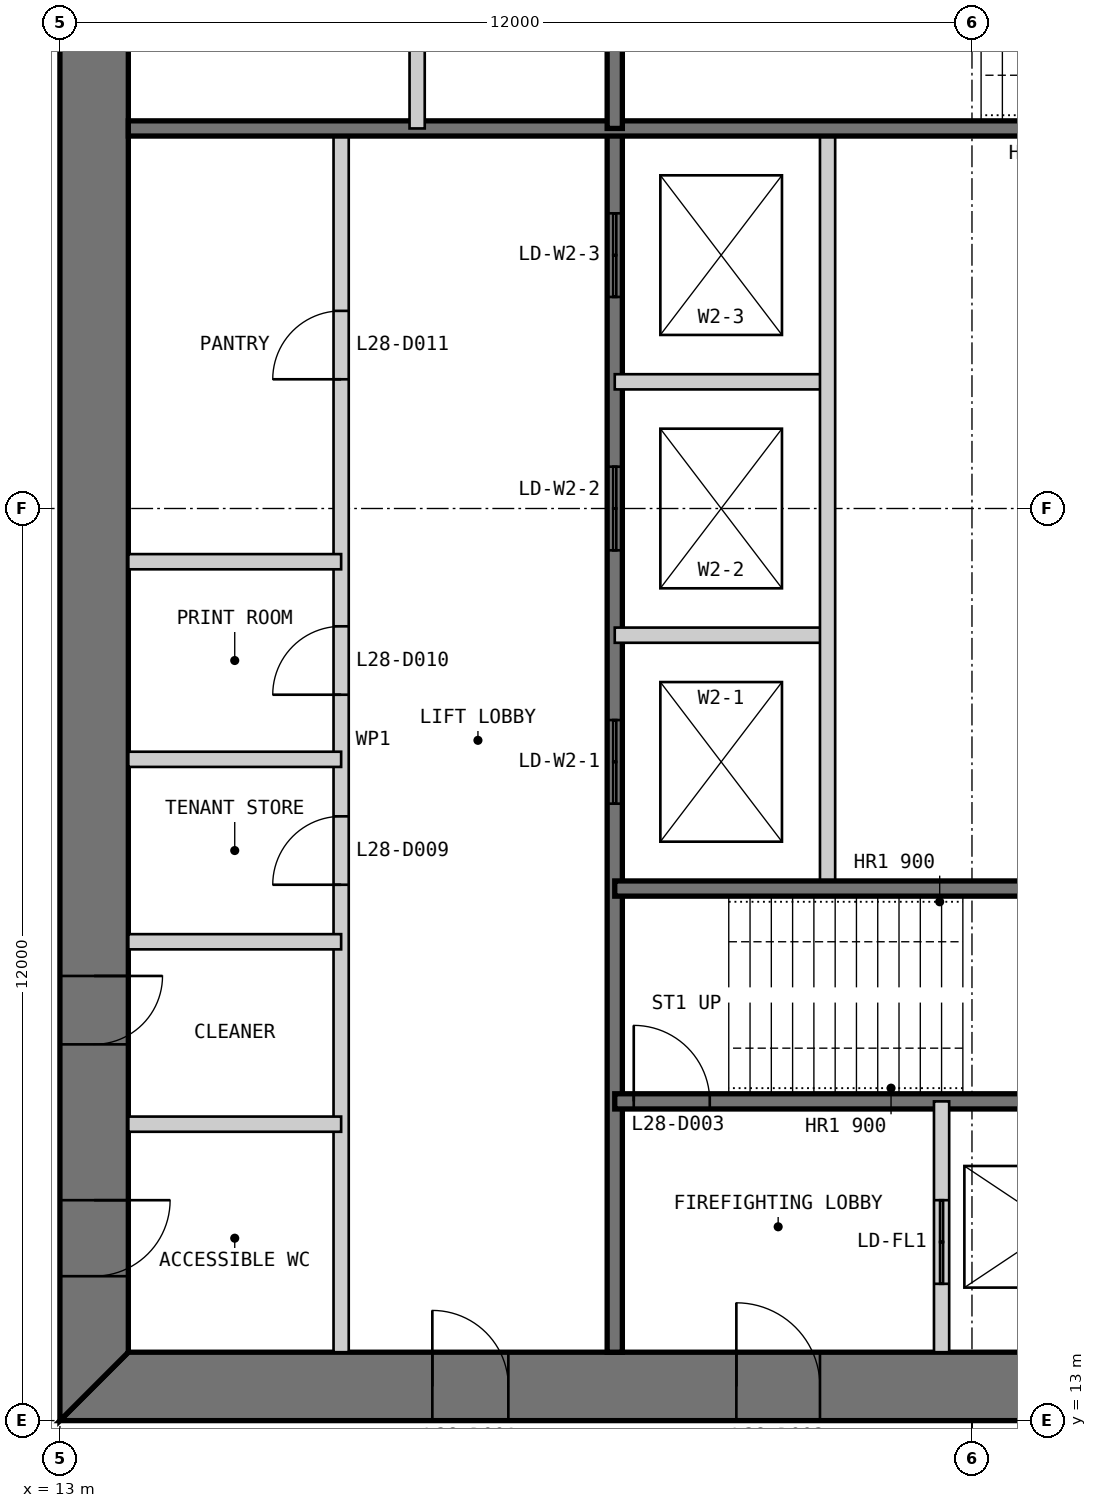
"""IFC4 building model, lengths in metres.
Left out: names, types, materials, properties, quantities, classifications, styles, units other than length and angle.
Written with IfcOpenShell. Run it as: python <this file> out.ifc"""

import sys

from ifc_helpers import new_model, si_unit, direction, frame, frame_2d, origin, place, context, subcontext, project, spatial, polyline, rectangle, outline, extrude, element, fill, save


model = new_model("IFC4")
c1 = context("Model", 3, precision=1e-05, world=origin(), true_north=direction((0.0, 1.0)))
c2 = subcontext(c1, "Body", "Model", "MODEL_VIEW")
j1 = project(units=[si_unit("LENGTHUNIT", "METRE"), si_unit("PLANEANGLEUNIT", "RADIAN")], contexts=[c1])
p1 = place(None, origin())
s1 = spatial("IfcSite", under=j1, at=p1, CompositionType="ELEMENT")
p2 = place(p1, origin())
s2 = spatial("IfcBuilding", under=s1, at=p2, CompositionType="ELEMENT")
p3 = place(p2, frame((0.0, 0.0, 122.4)))
s3 = spatial("IfcBuildingStorey", under=s2, at=p3, CompositionType="ELEMENT", Elevation=122.4)
p4 = place(p3, frame((13.0, 13.45, 0.0), z_axis=(0.0, 0.0, 1.0), x_axis=(1.0, 0.0, 0.0)))
e1 = element("IfcWall", 1, at=p4, inside=s3, PredefinedType="SHEAR", context=c2, shape_type="SweptSolid", body=[
    extrude(outline(polyline([(0.0, -0.45), (24.0, -0.45), (23.1, 0.45), (0.9, 0.45), (0.0, -0.45)])), origin(), (0.0, 0.0, 1.0), 4.0),
])
p5 = place(p4, frame((4.9, 0.0, 0.0)))
e2 = element("IfcOpeningElement", 2, at=p5, cuts=e1, PredefinedType="OPENING", context=c2, shape_type="SweptSolid", body=[
    extrude(rectangle(XDim=1.0, YDim=2.2, at=frame_2d((0.5, 1.1))), frame((0.0, 0.46, 0.0), z_axis=(0.0, -1.0, 0.0), x_axis=(1.0, 0.0, 0.0)), (0.0, 0.0, 1.0), 0.92),
])
p6 = place(p4, frame((8.9, 0.0, 0.0)))
e3 = element("IfcOpeningElement", 3, at=p6, cuts=e1, PredefinedType="OPENING", context=c2, shape_type="SweptSolid", body=[
    extrude(rectangle(XDim=1.1, YDim=2.2, at=frame_2d((0.55, 1.1))), frame((0.0, 0.46, 0.0), z_axis=(0.0, -1.0, 0.0), x_axis=(1.0, 0.0, 0.0)), (0.0, 0.0, 1.0), 0.92),
])
p7 = place(p4, frame((15.05, 0.0, 0.0)))
e4 = element("IfcOpeningElement", 4, at=p7, cuts=e1, PredefinedType="OPENING", context=c2, shape_type="SweptSolid", body=[
    extrude(rectangle(XDim=0.9, YDim=2.2, at=frame_2d((0.45, 1.1))), frame((0.0, 0.46, 0.0), z_axis=(0.0, -1.0, 0.0), x_axis=(1.0, 0.0, 0.0)), (0.0, 0.0, 1.0), 0.92),
])
p8 = place(p4, frame((17.9, 0.0, 0.0)))
e5 = element("IfcOpeningElement", 5, at=p8, cuts=e1, PredefinedType="OPENING", context=c2, shape_type="SweptSolid", body=[
    extrude(rectangle(XDim=1.0, YDim=2.2, at=frame_2d((0.5, 1.1))), frame((0.0, 0.46, 0.0), z_axis=(0.0, -1.0, 0.0), x_axis=(1.0, 0.0, 0.0)), (0.0, 0.0, 1.0), 0.92),
])
p9 = place(p4, frame((21.4, 0.0, 0.0)))
e6 = element("IfcOpeningElement", 6, at=p9, cuts=e1, PredefinedType="OPENING", context=c2, shape_type="SweptSolid", body=[
    extrude(rectangle(XDim=1.0, YDim=2.2, at=frame_2d((0.5, 1.1))), frame((0.0, 0.46, 0.0), z_axis=(0.0, -1.0, 0.0), x_axis=(1.0, 0.0, 0.0)), (0.0, 0.0, 1.0), 0.92),
])
p10 = place(p3, frame((13.45, 36.1, 0.0), z_axis=(0.0, 0.0, 1.0), x_axis=(0.0, -1.0, 0.0)))
e7 = element("IfcWall", 7, at=p10, inside=s3, PredefinedType="SHEAR", context=c2, shape_type="SweptSolid", body=[
    extrude(outline(polyline([(-0.9, -0.45), (23.1, -0.45), (22.2, 0.45), (0.0, 0.45), (-0.9, -0.45)])), origin(), (0.0, 0.0, 1.0), 4.0),
])
p11 = place(p10, frame((20.2, 0.0, 0.0)))
e8 = element("IfcOpeningElement", 8, at=p11, cuts=e7, PredefinedType="OPENING", context=c2, shape_type="SweptSolid", body=[
    extrude(rectangle(XDim=1.0, YDim=2.2, at=frame_2d((0.5, 1.1))), frame((0.0, 0.46, 0.0), z_axis=(0.0, -1.0, 0.0), x_axis=(1.0, 0.0, 0.0)), (0.0, 0.0, 1.0), 0.92),
])
p12 = place(p10, frame((17.25, 0.0, 0.0)))
e9 = element("IfcOpeningElement", 9, at=p12, cuts=e7, PredefinedType="OPENING", context=c2, shape_type="SweptSolid", body=[
    extrude(rectangle(XDim=0.9, YDim=2.2, at=frame_2d((0.45, 1.1))), frame((0.0, 0.46, 0.0), z_axis=(0.0, -1.0, 0.0), x_axis=(1.0, 0.0, 0.0)), (0.0, 0.0, 1.0), 0.92),
])
p13 = place(p3, frame((16.7, 13.9, 0.0), z_axis=(0.0, 0.0, 1.0), x_axis=(0.0, 1.0, 0.0)))
e10 = element("IfcWall", 10, at=p13, inside=s3, PredefinedType="PARTITIONING", context=c2, shape_type="SweptSolid", body=[
    extrude(rectangle(XDim=16.1, YDim=0.2, at=frame_2d((8.05, 0.0))), origin(), (0.0, 0.0, 1.0), 3.8),
])
p14 = place(p13, frame((6.15, 0.0, 0.0)))
e11 = element("IfcOpeningElement", 11, at=p14, cuts=e10, PredefinedType="OPENING", context=c2, shape_type="SweptSolid", body=[
    extrude(rectangle(XDim=0.9, YDim=2.2, at=frame_2d((0.45, 1.1))), frame((0.0, 0.11, 0.0), z_axis=(0.0, -1.0, 0.0), x_axis=(1.0, 0.0, 0.0)), (0.0, 0.0, 1.0), 0.22),
])
p15 = place(p13, frame((8.65, 0.0, 0.0)))
e12 = element("IfcOpeningElement", 12, at=p15, cuts=e10, PredefinedType="OPENING", context=c2, shape_type="SweptSolid", body=[
    extrude(rectangle(XDim=0.9, YDim=2.2, at=frame_2d((0.45, 1.1))), frame((0.0, 0.11, 0.0), z_axis=(0.0, -1.0, 0.0), x_axis=(1.0, 0.0, 0.0)), (0.0, 0.0, 1.0), 0.22),
])
p16 = place(p13, frame((12.8, 0.0, 0.0)))
e13 = element("IfcOpeningElement", 13, at=p16, cuts=e10, PredefinedType="OPENING", context=c2, shape_type="SweptSolid", body=[
    extrude(rectangle(XDim=0.9, YDim=2.2, at=frame_2d((0.45, 1.1))), frame((0.0, 0.11, 0.0), z_axis=(0.0, -1.0, 0.0), x_axis=(1.0, 0.0, 0.0)), (0.0, 0.0, 1.0), 0.22),
])
p17 = place(p3, frame((20.3, 13.9, 0.0), z_axis=(0.0, 0.0, 1.0), x_axis=(0.0, 1.0, 0.0)))
e14 = element("IfcWall", 14, at=p17, inside=s3, PredefinedType="SOLIDWALL", context=c2, shape_type="SweptSolid", body=[
    extrude(rectangle(XDim=16.1, YDim=0.2, at=frame_2d((8.05, 0.0))), origin(), (0.0, 0.0, 1.0), 3.8),
])
p18 = place(p17, frame((7.217, 0.0, 0.0)))
e15 = element("IfcOpeningElement", 15, at=p18, cuts=e14, PredefinedType="OPENING", context=c2, shape_type="SweptSolid", body=[
    extrude(rectangle(XDim=1.1, YDim=2.2, at=frame_2d((0.55, 1.1))), frame((0.0, 0.11, 0.0), z_axis=(0.0, -1.0, 0.0), x_axis=(1.0, 0.0, 0.0)), (0.0, 0.0, 1.0), 0.22),
])
p19 = place(p17, frame((10.55, 0.0, 0.0)))
e16 = element("IfcOpeningElement", 16, at=p19, cuts=e14, PredefinedType="OPENING", context=c2, shape_type="SweptSolid", body=[
    extrude(rectangle(XDim=1.1, YDim=2.2, at=frame_2d((0.55, 1.1))), frame((0.0, 0.11, 0.0), z_axis=(0.0, -1.0, 0.0), x_axis=(1.0, 0.0, 0.0)), (0.0, 0.0, 1.0), 0.22),
])
p20 = place(p17, frame((13.883, 0.0, 0.0)))
e17 = element("IfcOpeningElement", 17, at=p20, cuts=e14, PredefinedType="OPENING", context=c2, shape_type="SweptSolid", body=[
    extrude(rectangle(XDim=1.1, YDim=2.2, at=frame_2d((0.55, 1.1))), frame((0.0, 0.11, 0.0), z_axis=(0.0, -1.0, 0.0), x_axis=(1.0, 0.0, 0.0)), (0.0, 0.0, 1.0), 0.22),
])
for number, where, z_axis, x_axis in (
    (18, (20.3, 23.333, 0.0), (0.0, 0.0, 1.0), (1.0, 0.0, 0.0)),
    (19, (20.3, 26.667, 0.0), (0.0, 0.0, 1.0), (1.0, 0.0, 0.0)),
):
    element("IfcWall", number, at=place(p3, frame(where, z_axis=z_axis, x_axis=x_axis)), inside=s3, PredefinedType="PARTITIONING", context=c2, shape_type="SweptSolid", body=[
        extrude(rectangle(XDim=2.8, YDim=0.2, at=frame_2d((1.4, 0.0))), origin(), (0.0, 0.0, 1.0), 3.8),
    ])
p21 = place(p3, frame((23.1, 20.0, 0.0), z_axis=(0.0, 0.0, 1.0), x_axis=(0.0, 1.0, 0.0)))
e20 = element("IfcWall", 20, at=p21, inside=s3, PredefinedType="PARTITIONING", context=c2, shape_type="SweptSolid", body=[
    extrude(rectangle(XDim=10.0, YDim=0.2, at=frame_2d((5.0, 0.0))), origin(), (0.0, 0.0, 1.0), 3.8),
])
p22 = place(p3, frame((20.3, 17.2, 0.0), z_axis=(0.0, 0.0, 1.0), x_axis=(1.0, 0.0, 0.0)))
e21 = element("IfcWall", 21, at=p22, inside=s3, PredefinedType="SOLIDWALL", context=c2, shape_type="SweptSolid", body=[
    extrude(rectangle(XDim=9.4, YDim=0.2, at=frame_2d((4.7, 0.0))), origin(), (0.0, 0.0, 1.0), 3.8),
])
p23 = place(p22, frame((0.25, 0.0, 0.0)))
e22 = element("IfcOpeningElement", 22, at=p23, cuts=e21, PredefinedType="OPENING", context=c2, shape_type="SweptSolid", body=[
    extrude(rectangle(XDim=1.0, YDim=2.2, at=frame_2d((0.5, 1.1))), frame((0.0, 0.11, 0.0), z_axis=(0.0, -1.0, 0.0), x_axis=(1.0, 0.0, 0.0)), (0.0, 0.0, 1.0), 0.22),
])
p24 = place(p3, frame((20.3, 20.0, 0.0), z_axis=(0.0, 0.0, 1.0), x_axis=(1.0, 0.0, 0.0)))
e23 = element("IfcWall", 23, at=p24, inside=s3, PredefinedType="SOLIDWALL", context=c2, shape_type="SweptSolid", body=[
    extrude(rectangle(XDim=15.8, YDim=0.2, at=frame_2d((7.9, 0.0))), origin(), (0.0, 0.0, 1.0), 3.8),
])
p25 = place(p3, frame((24.6, 13.9, 0.0), z_axis=(0.0, 0.0, 1.0), x_axis=(0.0, 1.0, 0.0)))
e24 = element("IfcWall", 24, at=p25, inside=s3, PredefinedType="PARTITIONING", context=c2, shape_type="SweptSolid", body=[
    extrude(rectangle(XDim=3.3, YDim=0.2, at=frame_2d((1.65, 0.0))), origin(), (0.0, 0.0, 1.0), 3.8),
])
p26 = place(p25, frame((0.9, 0.0, 0.0)))
e25 = element("IfcOpeningElement", 25, at=p26, cuts=e24, PredefinedType="OPENING", context=c2, shape_type="SweptSolid", body=[
    extrude(rectangle(XDim=1.1, YDim=2.2, at=frame_2d((0.55, 1.1))), frame((0.0, 0.11, 0.0), z_axis=(0.0, -1.0, 0.0), x_axis=(1.0, 0.0, 0.0)), (0.0, 0.0, 1.0), 0.22),
])
for number, where, z_axis, x_axis in (
    (26, (13.9, 16.9, 0.0), (0.0, 0.0, 1.0), (1.0, 0.0, 0.0)),
    (27, (13.9, 19.3, 0.0), (0.0, 0.0, 1.0), (1.0, 0.0, 0.0)),
    (28, (13.9, 21.7, 0.0), (0.0, 0.0, 1.0), (1.0, 0.0, 0.0)),
    (29, (13.9, 24.3, 0.0), (0.0, 0.0, 1.0), (1.0, 0.0, 0.0)),
):
    element("IfcWall", number, at=place(p3, frame(where, z_axis=z_axis, x_axis=x_axis)), inside=s3, PredefinedType="PARTITIONING", context=c2, shape_type="SweptSolid", body=[
        extrude(rectangle(XDim=2.8, YDim=0.2, at=frame_2d((1.4, 0.0))), origin(), (0.0, 0.0, 1.0), 3.8),
    ])
p27 = place(p3, frame((29.7, 30.0, 0.0), z_axis=(0.0, 0.0, 1.0), x_axis=(-1.0, 0.0, 0.0)))
e30 = element("IfcWall", 30, at=p27, inside=s3, PredefinedType="SOLIDWALL", context=c2, shape_type="SweptSolid", body=[
    extrude(rectangle(XDim=15.8, YDim=0.2, at=frame_2d((7.9, 0.0))), origin(), (0.0, 0.0, 1.0), 3.8),
])
p28 = place(p3, frame((20.3, 36.1, 0.0), z_axis=(0.0, 0.0, 1.0), x_axis=(0.0, -1.0, 0.0)))
e31 = element("IfcWall", 31, at=p28, inside=s3, PredefinedType="SOLIDWALL", context=c2, shape_type="SweptSolid", body=[
    extrude(rectangle(XDim=6.1, YDim=0.2, at=frame_2d((3.05, 0.0))), origin(), (0.0, 0.0, 1.0), 3.8),
])
p29 = place(p3, frame((17.7, 36.1, 0.0), z_axis=(0.0, 0.0, 1.0), x_axis=(0.0, -1.0, 0.0)))
e32 = element("IfcWall", 32, at=p29, inside=s3, PredefinedType="PARTITIONING", context=c2, shape_type="SweptSolid", body=[
    extrude(rectangle(XDim=6.1, YDim=0.2, at=frame_2d((3.05, 0.0))), origin(), (0.0, 0.0, 1.0), 3.8),
])
p30 = place(p5, origin())
e33 = element("IfcDoor", 33, at=p30, inside=s3, OperationType="SINGLE_SWING_LEFT", PredefinedType="DOOR", context=c2, shape_type="SweptSolid", body=[
    extrude(rectangle(XDim=1.0, YDim=2.2, at=frame_2d((0.5, 1.1))), frame((0.0, 0.025, 0.0), z_axis=(0.0, -1.0, 0.0), x_axis=(1.0, 0.0, 0.0)), (0.0, 0.0, 1.0), 0.05),
    extrude(outline(polyline([(0.0, 0.0), (0.04, 0.0), (0.04, 2.16), (0.96, 2.16), (0.96, 0.0), (1.0, 0.0), (1.0, 2.2), (0.0, 2.2), (0.0, 0.0)])), frame((0.0, 0.3, 0.0), z_axis=(0.0, -1.0, 0.0), x_axis=(1.0, 0.0, 0.0)), (0.0, 0.0, 1.0), 0.6),
])
fill(e2, e33)
p31 = place(p6, origin())
e34 = element("IfcDoor", 34, at=p31, inside=s3, OperationType="SINGLE_SWING_LEFT", PredefinedType="DOOR", context=c2, shape_type="SweptSolid", body=[
    extrude(rectangle(XDim=1.1, YDim=2.2, at=frame_2d((0.55, 1.1))), frame((0.0, 0.025, 0.0), z_axis=(0.0, -1.0, 0.0), x_axis=(1.0, 0.0, 0.0)), (0.0, 0.0, 1.0), 0.05),
    extrude(outline(polyline([(0.0, 0.0), (0.04, 0.0), (0.04, 2.16), (1.06, 2.16), (1.06, 0.0), (1.1, 0.0), (1.1, 2.2), (0.0, 2.2), (0.0, 0.0)])), frame((0.0, 0.3, 0.0), z_axis=(0.0, -1.0, 0.0), x_axis=(1.0, 0.0, 0.0)), (0.0, 0.0, 1.0), 0.6),
])
fill(e3, e34)
p32 = place(p23, origin())
e35 = element("IfcDoor", 35, at=p32, inside=s3, OperationType="SINGLE_SWING_LEFT", PredefinedType="DOOR", context=c2, shape_type="SweptSolid", body=[
    extrude(rectangle(XDim=1.0, YDim=2.2, at=frame_2d((0.5, 1.1))), frame((0.0, 0.025, 0.0), z_axis=(0.0, -1.0, 0.0), x_axis=(1.0, 0.0, 0.0)), (0.0, 0.0, 1.0), 0.05),
])
fill(e22, e35)
p33 = place(p11, origin())
e36 = element("IfcDoor", 36, at=p33, inside=s3, OperationType="SINGLE_SWING_LEFT", PredefinedType="DOOR", context=c2, shape_type="SweptSolid", body=[
    extrude(rectangle(XDim=1.0, YDim=2.2, at=frame_2d((0.5, 1.1))), frame((0.0, 0.025, 0.0), z_axis=(0.0, -1.0, 0.0), x_axis=(1.0, 0.0, 0.0)), (0.0, 0.0, 1.0), 0.05),
    extrude(outline(polyline([(0.0, 0.0), (0.04, 0.0), (0.04, 2.16), (0.96, 2.16), (0.96, 0.0), (1.0, 0.0), (1.0, 2.2), (0.0, 2.2), (0.0, 0.0)])), frame((0.0, 0.3, 0.0), z_axis=(0.0, -1.0, 0.0), x_axis=(1.0, 0.0, 0.0)), (0.0, 0.0, 1.0), 0.6),
])
fill(e8, e36)
p34 = place(p12, origin())
e37 = element("IfcDoor", 37, at=p34, inside=s3, OperationType="SINGLE_SWING_LEFT", PredefinedType="DOOR", context=c2, shape_type="SweptSolid", body=[
    extrude(rectangle(XDim=0.9, YDim=2.2, at=frame_2d((0.45, 1.1))), frame((0.0, 0.025, 0.0), z_axis=(0.0, -1.0, 0.0), x_axis=(1.0, 0.0, 0.0)), (0.0, 0.0, 1.0), 0.05),
    extrude(outline(polyline([(0.0, 0.0), (0.04, 0.0), (0.04, 2.16), (0.86, 2.16), (0.86, 0.0), (0.9, 0.0), (0.9, 2.2), (0.0, 2.2), (0.0, 0.0)])), frame((0.0, 0.3, 0.0), z_axis=(0.0, -1.0, 0.0), x_axis=(1.0, 0.0, 0.0)), (0.0, 0.0, 1.0), 0.6),
])
fill(e9, e37)
p35 = place(p14, origin())
e38 = element("IfcDoor", 38, at=p35, inside=s3, OperationType="SINGLE_SWING_LEFT", PredefinedType="DOOR", context=c2, shape_type="SweptSolid", body=[
    extrude(rectangle(XDim=0.9, YDim=2.2, at=frame_2d((0.45, 1.1))), frame((0.0, 0.025, 0.0), z_axis=(0.0, -1.0, 0.0), x_axis=(1.0, 0.0, 0.0)), (0.0, 0.0, 1.0), 0.05),
])
fill(e11, e38)
p36 = place(p15, origin())
e39 = element("IfcDoor", 39, at=p36, inside=s3, OperationType="SINGLE_SWING_LEFT", PredefinedType="DOOR", context=c2, shape_type="SweptSolid", body=[
    extrude(rectangle(XDim=0.9, YDim=2.2, at=frame_2d((0.45, 1.1))), frame((0.0, 0.025, 0.0), z_axis=(0.0, -1.0, 0.0), x_axis=(1.0, 0.0, 0.0)), (0.0, 0.0, 1.0), 0.05),
])
fill(e12, e39)
p37 = place(p16, origin())
e40 = element("IfcDoor", 40, at=p37, inside=s3, OperationType="SINGLE_SWING_LEFT", PredefinedType="DOOR", context=c2, shape_type="SweptSolid", body=[
    extrude(rectangle(XDim=0.9, YDim=2.2, at=frame_2d((0.45, 1.1))), frame((0.0, 0.025, 0.0), z_axis=(0.0, -1.0, 0.0), x_axis=(1.0, 0.0, 0.0)), (0.0, 0.0, 1.0), 0.05),
])
fill(e13, e40)
p38 = place(p26, origin())
e41 = element("IfcDoor", 41, at=p38, inside=s3, OperationType="DOUBLE_DOOR_SLIDING", PredefinedType="DOOR", context=c2, shape_type="SweptSolid", body=[
    extrude(rectangle(XDim=1.1, YDim=2.2, at=frame_2d((0.55, 1.1))), frame((0.0, 0.025, 0.0), z_axis=(0.0, -1.0, 0.0), x_axis=(1.0, 0.0, 0.0)), (0.0, 0.0, 1.0), 0.05),
])
fill(e25, e41)
p39 = place(p18, origin())
e42 = element("IfcDoor", 42, at=p39, inside=s3, OperationType="DOUBLE_DOOR_SLIDING", PredefinedType="DOOR", context=c2, shape_type="SweptSolid", body=[
    extrude(rectangle(XDim=1.1, YDim=2.2, at=frame_2d((0.55, 1.1))), frame((0.0, 0.025, 0.0), z_axis=(0.0, -1.0, 0.0), x_axis=(1.0, 0.0, 0.0)), (0.0, 0.0, 1.0), 0.05),
])
fill(e15, e42)
p40 = place(p19, origin())
e43 = element("IfcDoor", 43, at=p40, inside=s3, OperationType="DOUBLE_DOOR_SLIDING", PredefinedType="DOOR", context=c2, shape_type="SweptSolid", body=[
    extrude(rectangle(XDim=1.1, YDim=2.2, at=frame_2d((0.55, 1.1))), frame((0.0, 0.025, 0.0), z_axis=(0.0, -1.0, 0.0), x_axis=(1.0, 0.0, 0.0)), (0.0, 0.0, 1.0), 0.05),
])
fill(e16, e43)
p41 = place(p20, origin())
e44 = element("IfcDoor", 44, at=p41, inside=s3, OperationType="DOUBLE_DOOR_SLIDING", PredefinedType="DOOR", context=c2, shape_type="SweptSolid", body=[
    extrude(rectangle(XDim=1.1, YDim=2.2, at=frame_2d((0.55, 1.1))), frame((0.0, 0.025, 0.0), z_axis=(0.0, -1.0, 0.0), x_axis=(1.0, 0.0, 0.0)), (0.0, 0.0, 1.0), 0.05),
])
fill(e17, e44)
save(model, sys.argv[1])
